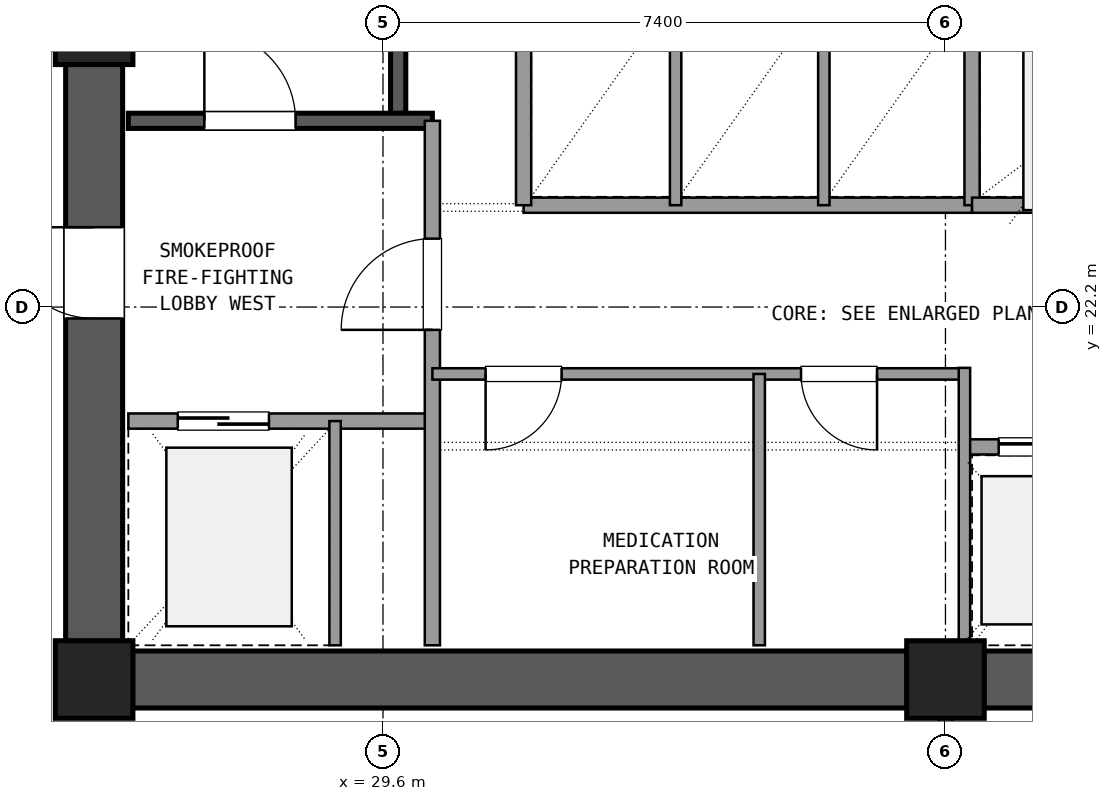
"""IFC4 building model, lengths in metres.
Left out: names, types, materials, properties, quantities, classifications, styles, units other than length and angle.
Written with IfcOpenShell. Run it as: python <this file> out.ifc"""

import sys

from ifc_helpers import new_model, si_unit, direction, frame, frame_2d, origin, origin_2d, place, context, subcontext, project, spatial, rectangle, extrude, element, fill, save


model = new_model("IFC4")
c1 = context("Model", 3, precision=1e-05, world=origin(), true_north=direction((0.0, 1.0)))
c2 = subcontext(c1, "Body", "Model", "MODEL_VIEW")
j1 = project(units=[si_unit("LENGTHUNIT", "METRE"), si_unit("PLANEANGLEUNIT", "RADIAN")], contexts=[c1])
p1 = place(None, origin())
s1 = spatial("IfcSite", under=j1, at=p1, CompositionType="ELEMENT")
p2 = place(p1, origin())
s2 = spatial("IfcBuilding", under=s1, at=p2, CompositionType="ELEMENT")
p3 = place(p2, frame((0.0, 0.0, 106.38)))
s3 = spatial("IfcBuildingStorey", under=s2, at=p3, CompositionType="ELEMENT", Elevation=106.38)
for number, where, z_axis, x_axis in (
    (1, (25.8, 17.3, 0.0), (0.0, 0.0, 1.0), (1.0, 0.0, 0.0)),
    (2, (37.0, 17.3, 0.0), (0.0, 0.0, 1.0), (1.0, 0.0, 0.0)),
    (3, (25.8, 25.9, 0.0), (0.0, 0.0, 1.0), (1.0, 0.0, 0.0)),
):
    element("IfcColumn", number, at=place(p3, frame(where, z_axis=z_axis, x_axis=x_axis)), inside=s3, PredefinedType="COLUMN", context=c2, shape_type="SweptSolid", body=[
        extrude(rectangle(XDim=1.02, YDim=1.02, at=origin_2d()), origin(), (0.0, 0.0, 1.0), 3.6),
    ])
for number, where, z_axis, x_axis in (
    (4, (26.305, 17.3, 0.0), (0.0, 0.0, 1.0), (1.0, 0.0, 0.0)),
    (5, (37.505, 17.3, 0.0), (0.0, 0.0, 1.0), (1.0, 0.0, 0.0)),
):
    element("IfcWall", number, at=place(p3, frame(where, z_axis=z_axis, x_axis=x_axis)), inside=s3, PredefinedType="SHEAR", context=c2, shape_type="SweptSolid", body=[
        extrude(rectangle(XDim=10.19, YDim=0.75, at=frame_2d((5.095, 0.0))), origin(), (0.0, 0.0, 1.0), 3.32),
    ])
p4 = place(p3, frame((25.8, 25.395, 0.0), z_axis=(0.0, 0.0, 1.0), x_axis=(0.0, -1.0, 0.0)))
e6 = element("IfcWall", 6, at=p4, inside=s3, PredefinedType="SHEAR", context=c2, shape_type="SweptSolid", body=[
    extrude(rectangle(XDim=7.59, YDim=0.75, at=frame_2d((3.795, 0.0))), origin(), (0.0, 0.0, 1.0), 3.32),
])
p5 = place(p4, frame((2.145, 0.0, 0.0)))
e7 = element("IfcOpeningElement", 7, at=p5, cuts=e6, PredefinedType="OPENING", context=c2, shape_type="SweptSolid", body=[
    extrude(rectangle(XDim=1.2, YDim=2.15, at=frame_2d((0.6, 1.075))), frame((0.0, 0.385, 0.0), z_axis=(0.0, -1.0, 0.0), x_axis=(1.0, 0.0, 0.0)), (0.0, 0.0, 1.0), 0.77),
])
p6 = place(p3, frame((29.8, 24.65, 0.0), z_axis=(0.0, 0.0, 1.0), x_axis=(0.0, 1.0, 0.0)))
e8 = element("IfcWall", 8, at=p6, inside=s3, PredefinedType="SHEAR", context=c2, shape_type="SweptSolid", body=[
    extrude(rectangle(XDim=9.4, YDim=0.2, at=frame_2d((4.7, 0.0))), origin(), (0.0, 0.0, 1.0), 3.32),
])
p7 = place(p3, frame((26.25, 24.65, 0.0), z_axis=(0.0, 0.0, 1.0), x_axis=(1.0, 0.0, 0.0)))
e9 = element("IfcWall", 9, at=p7, inside=s3, PredefinedType="SHEAR", context=c2, shape_type="SweptSolid", body=[
    extrude(rectangle(XDim=4.0, YDim=0.2, at=frame_2d((2.0, 0.0))), origin(), (0.0, 0.0, 1.0), 3.32),
])
p8 = place(p7, frame((1.0, 0.0, 0.0)))
e10 = element("IfcOpeningElement", 10, at=p8, cuts=e9, PredefinedType="OPENING", context=c2, shape_type="SweptSolid", body=[
    extrude(rectangle(XDim=1.2, YDim=2.15, at=frame_2d((0.6, 1.075))), frame((0.0, 0.11, 0.0), z_axis=(0.0, -1.0, 0.0), x_axis=(1.0, 0.0, 0.0)), (0.0, 0.0, 1.0), 0.22),
])
p9 = place(p3, frame((26.25, 20.7, 0.0), z_axis=(0.0, 0.0, 1.0), x_axis=(1.0, 0.0, 0.0)))
e11 = element("IfcWall", 11, at=p9, inside=s3, PredefinedType="SOLIDWALL", context=c2, shape_type="SweptSolid", body=[
    extrude(rectangle(XDim=4.0, YDim=0.2, at=frame_2d((2.0, 0.0))), origin(), (0.0, 0.0, 1.0), 2.61),
])
p10 = place(p9, frame((0.65, 0.0, 0.0)))
e12 = element("IfcOpeningElement", 12, at=p10, cuts=e11, PredefinedType="OPENING", context=c2, shape_type="SweptSolid", body=[
    extrude(rectangle(XDim=1.2, YDim=2.15, at=frame_2d((0.6, 1.075))), frame((0.0, 0.11, 0.0), z_axis=(0.0, -1.0, 0.0), x_axis=(1.0, 0.0, 0.0)), (0.0, 0.0, 1.0), 0.22),
])
p11 = place(p3, frame((30.25, 17.75, 0.0), z_axis=(0.0, 0.0, 1.0), x_axis=(0.0, 1.0, 0.0)))
e13 = element("IfcWall", 13, at=p11, inside=s3, PredefinedType="SOLIDWALL", context=c2, shape_type="SweptSolid", body=[
    extrude(rectangle(XDim=6.9, YDim=0.2, at=frame_2d((3.45, 0.0))), origin(), (0.0, 0.0, 1.0), 2.61),
])
p12 = place(p11, frame((4.15, 0.0, 0.0)))
e14 = element("IfcOpeningElement", 14, at=p12, cuts=e13, PredefinedType="OPENING", context=c2, shape_type="SweptSolid", body=[
    extrude(rectangle(XDim=1.2, YDim=2.15, at=frame_2d((0.6, 1.075))), frame((0.0, 0.11, 0.0), z_axis=(0.0, -1.0, 0.0), x_axis=(1.0, 0.0, 0.0)), (0.0, 0.0, 1.0), 0.22),
])
p13 = place(p3, frame((28.97, 17.75, 0.0), z_axis=(0.0, 0.0, 1.0), x_axis=(0.0, 1.0, 0.0)))
e15 = element("IfcWall", 15, at=p13, inside=s3, PredefinedType="PARTITIONING", context=c2, shape_type="SweptSolid", body=[
    extrude(rectangle(XDim=2.95, YDim=0.15, at=frame_2d((1.475, 0.0))), origin(), (0.0, 0.0, 1.0), 2.61),
])
p14 = place(p3, frame((30.25, 21.32, 0.0), z_axis=(0.0, 0.0, 1.0), x_axis=(1.0, 0.0, 0.0)))
e16 = element("IfcWall", 16, at=p14, inside=s3, PredefinedType="PARTITIONING", context=c2, shape_type="SweptSolid", body=[
    extrude(rectangle(XDim=7.0, YDim=0.15, at=frame_2d((3.5, 0.0))), origin(), (0.0, 0.0, 1.0), 2.61),
])
p15 = place(p14, frame((0.7, 0.0, 0.0)))
e17 = element("IfcOpeningElement", 17, at=p15, cuts=e16, PredefinedType="OPENING", context=c2, shape_type="SweptSolid", body=[
    extrude(rectangle(XDim=1.0, YDim=2.15, at=frame_2d((0.5, 1.075))), frame((0.0, 0.085, 0.0), z_axis=(0.0, -1.0, 0.0), x_axis=(1.0, 0.0, 0.0)), (0.0, 0.0, 1.0), 0.17),
])
p16 = place(p14, frame((4.85, 0.0, 0.0)))
e18 = element("IfcOpeningElement", 18, at=p16, cuts=e16, PredefinedType="OPENING", context=c2, shape_type="SweptSolid", body=[
    extrude(rectangle(XDim=1.0, YDim=2.15, at=frame_2d((0.5, 1.075))), frame((0.0, 0.085, 0.0), z_axis=(0.0, -1.0, 0.0), x_axis=(1.0, 0.0, 0.0)), (0.0, 0.0, 1.0), 0.17),
])
p17 = place(p3, frame((34.55, 17.75, 0.0), z_axis=(0.0, 0.0, 1.0), x_axis=(0.0, 1.0, 0.0)))
e19 = element("IfcWall", 19, at=p17, inside=s3, PredefinedType="PARTITIONING", context=c2, shape_type="SweptSolid", body=[
    extrude(rectangle(XDim=3.57, YDim=0.15, at=frame_2d((1.785, 0.0))), origin(), (0.0, 0.0, 1.0), 2.61),
])
p18 = place(p3, frame((37.25, 20.36, 0.0), z_axis=(0.0, 0.0, 1.0), x_axis=(1.0, 0.0, 0.0)))
e20 = element("IfcWall", 20, at=p18, inside=s3, PredefinedType="SOLIDWALL", context=c2, shape_type="SweptSolid", body=[
    extrude(rectangle(XDim=6.1, YDim=0.2, at=frame_2d((3.05, 0.0))), origin(), (0.0, 0.0, 1.0), 2.61),
])
p19 = place(p18, frame((0.45, 0.0, 0.0)))
e21 = element("IfcOpeningElement", 21, at=p19, cuts=e20, PredefinedType="OPENING", context=c2, shape_type="SweptSolid", body=[
    extrude(rectangle(XDim=1.1, YDim=2.15, at=frame_2d((0.55, 1.075))), frame((0.0, 0.11, 0.0), z_axis=(0.0, -1.0, 0.0), x_axis=(1.0, 0.0, 0.0)), (0.0, 0.0, 1.0), 0.22),
])
p20 = place(p18, frame((2.5, 0.0, 0.0)))
e22 = element("IfcOpeningElement", 22, at=p20, cuts=e20, PredefinedType="OPENING", context=c2, shape_type="SweptSolid", body=[
    extrude(rectangle(XDim=1.1, YDim=2.15, at=frame_2d((0.55, 1.075))), frame((0.0, 0.11, 0.0), z_axis=(0.0, -1.0, 0.0), x_axis=(1.0, 0.0, 0.0)), (0.0, 0.0, 1.0), 0.22),
])
p21 = place(p18, frame((4.55, 0.0, 0.0)))
e23 = element("IfcOpeningElement", 23, at=p21, cuts=e20, PredefinedType="OPENING", context=c2, shape_type="SweptSolid", body=[
    extrude(rectangle(XDim=1.1, YDim=2.15, at=frame_2d((0.55, 1.075))), frame((0.0, 0.11, 0.0), z_axis=(0.0, -1.0, 0.0), x_axis=(1.0, 0.0, 0.0)), (0.0, 0.0, 1.0), 0.22),
])
p22 = place(p3, frame((37.25, 17.75, 0.0), z_axis=(0.0, 0.0, 1.0), x_axis=(0.0, 1.0, 0.0)))
e24 = element("IfcWall", 24, at=p22, inside=s3, PredefinedType="PARTITIONING", context=c2, shape_type="SweptSolid", body=[
    extrude(rectangle(XDim=3.65, YDim=0.15, at=frame_2d((1.825, 0.0))), origin(), (0.0, 0.0, 1.0), 2.61),
])
p23 = place(p3, frame((31.45, 23.54, 0.0), z_axis=(0.0, 0.0, 1.0), x_axis=(1.0, 0.0, 0.0)))
e25 = element("IfcWall", 25, at=p23, inside=s3, PredefinedType="SOLIDWALL", context=c2, shape_type="SweptSolid", body=[
    extrude(rectangle(XDim=5.9, YDim=0.2, at=frame_2d((2.95, 0.0))), origin(), (0.0, 0.0, 1.0), 2.61),
])
p24 = place(p3, frame((31.45, 23.54, 0.0), z_axis=(0.0, 0.0, 1.0), x_axis=(0.0, 1.0, 0.0)))
e26 = element("IfcWall", 26, at=p24, inside=s3, PredefinedType="SOLIDWALL", context=c2, shape_type="SweptSolid", body=[
    extrude(rectangle(XDim=2.81, YDim=0.2, at=frame_2d((1.405, 0.0))), origin(), (0.0, 0.0, 1.0), 2.61),
])
for number, where, z_axis, x_axis in (
    (27, (33.45, 23.54, 0.0), (0.0, 0.0, 1.0), (0.0, 1.0, 0.0)),
    (28, (35.4, 23.54, 0.0), (0.0, 0.0, 1.0), (0.0, 1.0, 0.0)),
):
    element("IfcWall", number, at=place(p3, frame(where, z_axis=z_axis, x_axis=x_axis)), inside=s3, PredefinedType="PARTITIONING", context=c2, shape_type="SweptSolid", body=[
        extrude(rectangle(XDim=2.81, YDim=0.15, at=frame_2d((1.405, 0.0))), origin(), (0.0, 0.0, 1.0), 2.61),
    ])
p25 = place(p3, frame((37.35, 23.54, 0.0), z_axis=(0.0, 0.0, 1.0), x_axis=(0.0, 1.0, 0.0)))
e29 = element("IfcWall", 29, at=p25, inside=s3, PredefinedType="SOLIDWALL", context=c2, shape_type="SweptSolid", body=[
    extrude(rectangle(XDim=6.82, YDim=0.2, at=frame_2d((3.41, 0.0))), origin(), (0.0, 0.0, 1.0), 2.61),
])
p26 = place(p3, frame((37.35, 23.54, 0.0), z_axis=(0.0, 0.0, 1.0), x_axis=(1.0, 0.0, 0.0)))
e30 = element("IfcWall", 30, at=p26, inside=s3, PredefinedType="SOLIDWALL", context=c2, shape_type="SweptSolid", body=[
    extrude(rectangle(XDim=3.05, YDim=0.2, at=frame_2d((1.525, 0.0))), origin(), (0.0, 0.0, 1.0), 2.61),
])
p27 = place(p3, frame((37.0, 13.64, 0.0), z_axis=(0.0, 0.0, 1.0), x_axis=(0.0, 1.0, 0.0)))
e31 = element("IfcWall", 31, at=p27, inside=s3, PredefinedType="PARTITIONING", context=c2, shape_type="SweptSolid", body=[
    extrude(rectangle(XDim=3.21, YDim=0.18, at=frame_2d((1.605, 0.0))), origin(), (0.0, 0.0, 1.0), 2.61),
])
p28 = place(p27, frame((0.605, 0.0, 0.0)))
e32 = element("IfcOpeningElement", 32, at=p28, cuts=e31, PredefinedType="OPENING", context=c2, shape_type="SweptSolid", body=[
    extrude(rectangle(XDim=2.0, YDim=2.2, at=frame_2d((1.0, 1.1))), frame((0.0, 0.1, 0.0), z_axis=(0.0, -1.0, 0.0), x_axis=(1.0, 0.0, 0.0)), (0.0, 0.0, 1.0), 0.2),
])
p29 = place(p8, origin())
e33 = element("IfcDoor", 33, at=p29, inside=s3, OperationType="SINGLE_SWING_LEFT", PredefinedType="DOOR", context=c2, shape_type="SweptSolid", body=[
    extrude(rectangle(XDim=1.2, YDim=2.15, at=frame_2d((0.6, 1.075))), frame((0.0, 0.025, 0.0), z_axis=(0.0, -1.0, 0.0), x_axis=(1.0, 0.0, 0.0)), (0.0, 0.0, 1.0), 0.05),
])
fill(e10, e33)
p30 = place(p10, origin())
e34 = element("IfcDoor", 34, at=p30, inside=s3, OperationType="SLIDING_TO_LEFT", PredefinedType="DOOR", context=c2, shape_type="SweptSolid", body=[
    extrude(rectangle(XDim=1.2, YDim=2.15, at=frame_2d((0.6, 1.075))), frame((0.0, 0.025, 0.0), z_axis=(0.0, -1.0, 0.0), x_axis=(1.0, 0.0, 0.0)), (0.0, 0.0, 1.0), 0.05),
])
fill(e12, e34)
p31 = place(p12, origin())
e35 = element("IfcDoor", 35, at=p31, inside=s3, OperationType="SINGLE_SWING_LEFT", PredefinedType="DOOR", context=c2, shape_type="SweptSolid", body=[
    extrude(rectangle(XDim=1.2, YDim=2.15, at=frame_2d((0.6, 1.075))), frame((0.0, 0.025, 0.0), z_axis=(0.0, -1.0, 0.0), x_axis=(1.0, 0.0, 0.0)), (0.0, 0.0, 1.0), 0.05),
])
fill(e14, e35)
p32 = place(p5, frame((1.2, 0.0, 0.0), z_axis=(0.0, 0.0, 1.0), x_axis=(-1.0, 0.0, 0.0)))
e36 = element("IfcDoor", 36, at=p32, inside=s3, OperationType="SINGLE_SWING_LEFT", PredefinedType="DOOR", context=c2, shape_type="SweptSolid", body=[
    extrude(rectangle(XDim=1.2, YDim=2.15, at=frame_2d((0.6, 1.075))), frame((0.0, 0.025, 0.0), z_axis=(0.0, -1.0, 0.0), x_axis=(1.0, 0.0, 0.0)), (0.0, 0.0, 1.0), 0.05),
])
fill(e7, e36)
p33 = place(p15, frame((1.0, 0.0, 0.0), z_axis=(0.0, 0.0, 1.0), x_axis=(-1.0, 0.0, 0.0)))
e37 = element("IfcDoor", 37, at=p33, inside=s3, OperationType="SINGLE_SWING_LEFT", PredefinedType="DOOR", context=c2, shape_type="SweptSolid", body=[
    extrude(rectangle(XDim=1.0, YDim=2.15, at=frame_2d((0.5, 1.075))), frame((0.0, 0.025, 0.0), z_axis=(0.0, -1.0, 0.0), x_axis=(1.0, 0.0, 0.0)), (0.0, 0.0, 1.0), 0.05),
])
fill(e17, e37)
p34 = place(p16, frame((1.0, 0.0, 0.0), z_axis=(0.0, 0.0, 1.0), x_axis=(-1.0, 0.0, 0.0)))
e38 = element("IfcDoor", 38, at=p34, inside=s3, OperationType="SINGLE_SWING_RIGHT", PredefinedType="DOOR", context=c2, shape_type="SweptSolid", body=[
    extrude(rectangle(XDim=1.0, YDim=2.15, at=frame_2d((0.5, 1.075))), frame((0.0, 0.025, 0.0), z_axis=(0.0, -1.0, 0.0), x_axis=(1.0, 0.0, 0.0)), (0.0, 0.0, 1.0), 0.05),
])
fill(e18, e38)
p35 = place(p19, origin())
e39 = element("IfcDoor", 39, at=p35, inside=s3, OperationType="SLIDING_TO_LEFT", PredefinedType="DOOR", context=c2, shape_type="SweptSolid", body=[
    extrude(rectangle(XDim=1.1, YDim=2.15, at=frame_2d((0.55, 1.075))), frame((0.0, 0.025, 0.0), z_axis=(0.0, -1.0, 0.0), x_axis=(1.0, 0.0, 0.0)), (0.0, 0.0, 1.0), 0.05),
])
fill(e21, e39)
save(model, sys.argv[1])
